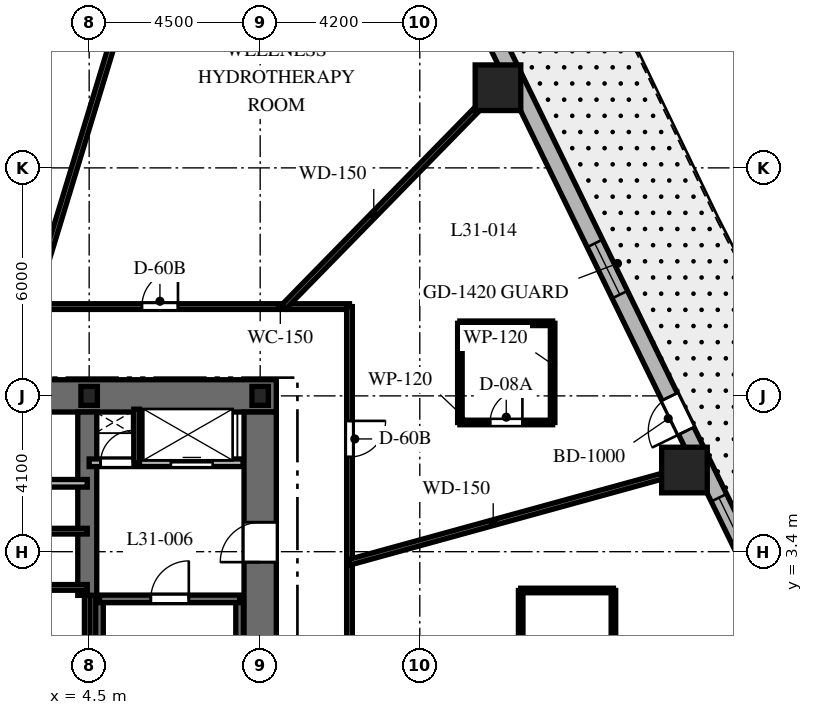
"""IFC4 building model, lengths in metres.
Left out: names, types, materials, properties, quantities, classifications, styles, units other than length and angle.
Written with IfcOpenShell. Run it as: python <this file> out.ifc"""

import sys

from ifc_helpers import new_model, si_unit, direction, frame, frame_2d, origin, origin_2d, place, context, subcontext, project, spatial, rectangle, i_section, extrude, element, fill, save


model = new_model("IFC4")
c1 = context("Model", 3, precision=1e-05, world=origin(), true_north=direction((0.0, 1.0)))
c2 = subcontext(c1, "Body", "Model", "MODEL_VIEW")
j1 = project(units=[si_unit("LENGTHUNIT", "METRE"), si_unit("PLANEANGLEUNIT", "RADIAN")], contexts=[c1])
p1 = place(None, origin())
s1 = spatial("IfcSite", under=j1, at=p1, CompositionType="ELEMENT")
p2 = place(p1, origin())
s2 = spatial("IfcBuilding", under=s1, at=p2, CompositionType="ELEMENT")
p3 = place(p2, frame((0.0, 0.0, 128.4)))
s3 = spatial("IfcBuildingStorey", under=s2, at=p3, CompositionType="ELEMENT", Elevation=128.4)
p4 = place(p3, frame((1.85, 7.5, 0.0), z_axis=(0.0, 0.0, 1.0), x_axis=(1.0, 0.0, 0.0)))
e1 = element("IfcWall", 1, at=p4, inside=s3, PredefinedType="SHEAR", context=c2, shape_type="SweptSolid", body=[
    extrude(rectangle(XDim=7.575, YDim=0.85, at=frame_2d((3.788, 0.0))), origin(), (0.0, 0.0, 1.0), 3.7),
])
p5 = place(p3, frame((9.0, -7.075, 0.0), z_axis=(0.0, 0.0, 1.0), x_axis=(0.0, 1.0, 0.0)))
e2 = element("IfcWall", 2, at=p5, inside=s3, PredefinedType="SHEAR", context=c2, shape_type="SweptSolid", body=[
    extrude(rectangle(XDim=14.15, YDim=0.85, at=frame_2d((7.075, 0.0))), origin(), (0.0, 0.0, 1.0), 3.7),
])
p6 = place(p5, frame((10.2, 0.0, 0.0)))
e3 = element("IfcOpeningElement", 3, at=p6, cuts=e2, PredefinedType="OPENING", context=c2, shape_type="SweptSolid", body=[
    extrude(rectangle(XDim=1.05, YDim=2.15, at=frame_2d((0.525, 1.075))), frame((0.0, 0.435, 0.0), z_axis=(0.0, -1.0, 0.0), x_axis=(1.0, 0.0, 0.0)), (0.0, 0.0, 1.0), 0.87),
])
p7 = place(p3, frame((4.45, 2.25, 0.0), z_axis=(0.0, 0.0, 1.0), x_axis=(0.0, 1.0, 0.0)))
e4 = element("IfcWall", 4, at=p7, inside=s3, PredefinedType="SHEAR", context=c2, shape_type="SweptSolid", body=[
    extrude(rectangle(XDim=4.825, YDim=0.5, at=frame_2d((2.413, 0.0))), origin(), (0.0, 0.0, 1.0), 3.7),
])
for number, where, z_axis, x_axis in (
    (5, (4.772, -6.985, 0.0), (0.0, 0.0, 1.0), (0.0, 1.0, 0.0)),
    (6, (8.458, -6.985, 0.0), (0.0, 0.0, 1.0), (0.0, 1.0, 0.0)),
):
    element("IfcWall", number, at=place(p3, frame(where, z_axis=z_axis, x_axis=x_axis)), inside=s3, PredefinedType="SHEAR", context=c2, shape_type="SweptSolid", body=[
        extrude(rectangle(XDim=9.143, YDim=0.2, at=frame_2d((4.572, 0.0))), origin(), (0.0, 0.0, 1.0), 3.7),
    ])
p8 = place(p3, frame((4.772, 2.158, 0.0), z_axis=(0.0, 0.0, 1.0), x_axis=(1.0, 0.0, 0.0)))
e7 = element("IfcWall", 7, at=p8, inside=s3, PredefinedType="SHEAR", context=c2, shape_type="SweptSolid", body=[
    extrude(rectangle(XDim=3.686, YDim=0.2, at=frame_2d((1.843, 0.0))), origin(), (0.0, 0.0, 1.0), 3.7),
])
p9 = place(p8, frame((1.35, 0.0, 0.0)))
e8 = element("IfcOpeningElement", 8, at=p9, cuts=e7, PredefinedType="OPENING", context=c2, shape_type="SweptSolid", body=[
    extrude(rectangle(XDim=1.0, YDim=2.15, at=frame_2d((0.5, 1.075))), frame((0.0, 0.11, 0.0), z_axis=(0.0, -1.0, 0.0), x_axis=(1.0, 0.0, 0.0)), (0.0, 0.0, 1.0), 0.22),
])
for number, where, z_axis, x_axis in (
    (9, (9.0, 7.5, 0.0), (0.0, 0.0, 1.0), (1.0, 0.0, 0.0)),
    (10, (4.5, 7.5, 0.0), (0.0, 0.0, 1.0), (1.0, 0.0, 0.0)),
):
    element("IfcColumn", number, at=place(p3, frame(where, z_axis=z_axis, x_axis=x_axis)), inside=s3, PredefinedType="COLUMN", context=c2, shape_type="SweptSolid", body=[
        extrude(i_section(OverallWidth=0.432, OverallDepth=0.498, WebThickness=0.056, FlangeThickness=0.089, at=origin_2d()), origin(), (0.0, 0.0, 1.0), 3.7),
    ])
for number, where, z_axis, x_axis in (
    (11, (20.164, 5.549, 0.0), (0.0, 0.0, 1.0), (1.0, 0.0, 0.0)),
    (12, (15.257, 15.609, 0.0), (0.0, 0.0, 1.0), (1.0, 0.0, 0.0)),
):
    element("IfcColumn", number, at=place(p3, frame(where, z_axis=z_axis, x_axis=x_axis)), inside=s3, PredefinedType="COLUMN", context=c2, shape_type="SweptSolid", body=[
        extrude(rectangle(XDim=1.2, YDim=1.2, at=origin_2d()), origin(), (0.0, 0.0, 1.0), 3.7),
    ])
p10 = place(p3, frame((22.238, 2.427, 0.0), z_axis=(0.0, 0.0, 1.0), x_axis=(-0.438374803278, 0.898792262901, 0.0)))
e13 = element("IfcWall", 13, at=p10, inside=s3, PredefinedType="SOLIDWALL", context=c2, shape_type="SweptSolid", body=[
    extrude(rectangle(XDim=18.618, YDim=0.45, at=frame_2d((9.309, 0.0))), origin(), (0.0, 0.0, 1.0), 3.4),
])
p11 = place(p10, frame((4.62, 0.0, 0.0)))
e14 = element("IfcOpeningElement", 14, at=p11, cuts=e13, PredefinedType="OPENING", context=c2, shape_type="SweptSolid", body=[
    extrude(rectangle(XDim=1.0, YDim=2.15, at=frame_2d((0.5, 1.075))), frame((0.0, 0.235, 0.0), z_axis=(0.0, -1.0, 0.0), x_axis=(1.0, 0.0, 0.0)), (0.0, 0.0, 1.0), 0.47),
])
p12 = place(p10, frame((8.61, 0.0, 0.8)))
e15 = element("IfcOpeningElement", 15, at=p12, cuts=e13, PredefinedType="OPENING", context=c2, shape_type="SweptSolid", body=[
    extrude(rectangle(XDim=1.5, YDim=1.8, at=frame_2d((0.75, 0.9))), frame((0.0, 0.235, 0.0), z_axis=(0.0, -1.0, 0.0), x_axis=(1.0, 0.0, 0.0)), (0.0, 0.0, 1.0), 0.47),
])
p13 = place(p10, frame((16.006, 0.0, 0.8)))
e16 = element("IfcOpeningElement", 16, at=p13, cuts=e13, PredefinedType="OPENING", context=c2, shape_type="SweptSolid", body=[
    extrude(rectangle(XDim=1.5, YDim=1.8, at=frame_2d((0.75, 0.9))), frame((0.0, 0.235, 0.0), z_axis=(0.0, -1.0, 0.0), x_axis=(1.0, 0.0, 0.0)), (0.0, 0.0, 1.0), 0.47),
])
p14 = place(p10, frame((1.163, 0.0, 0.8)))
e17 = element("IfcOpeningElement", 17, at=p14, cuts=e13, PredefinedType="OPENING", context=c2, shape_type="SweptSolid", body=[
    extrude(rectangle(XDim=1.5, YDim=1.8, at=frame_2d((0.75, 0.9))), frame((0.0, 0.235, 0.0), z_axis=(0.0, -1.0, 0.0), x_axis=(1.0, 0.0, 0.0)), (0.0, 0.0, 1.0), 0.47),
])
p15 = place(p3, frame((4.5, 5.74, 0.0), z_axis=(0.0, 0.0, 1.0), x_axis=(1.0, 0.0, 0.0)))
e18 = element("IfcWall", 18, at=p15, inside=s3, PredefinedType="PARTITIONING", context=c2, shape_type="SweptSolid", body=[
    extrude(rectangle(XDim=4.05, YDim=0.2, at=frame_2d((2.025, 0.0))), origin(), (0.0, 0.0, 1.0), 3.4),
])
p16 = place(p15, frame((0.3, 0.0, 0.0)))
e19 = element("IfcOpeningElement", 19, at=p16, cuts=e18, PredefinedType="OPENING", context=c2, shape_type="SweptSolid", body=[
    extrude(rectangle(XDim=0.85, YDim=2.03, at=frame_2d((0.425, 1.015))), frame((0.0, 0.11, 0.0), z_axis=(0.0, -1.0, 0.0), x_axis=(1.0, 0.0, 0.0)), (0.0, 0.0, 1.0), 0.22),
])
p17 = place(p15, frame((2.15, 0.0, 0.0)))
e20 = element("IfcOpeningElement", 20, at=p17, cuts=e18, PredefinedType="OPENING", context=c2, shape_type="SweptSolid", body=[
    extrude(rectangle(XDim=1.1, YDim=2.2, at=frame_2d((0.55, 1.1))), frame((0.0, 0.11, 0.0), z_axis=(0.0, -1.0, 0.0), x_axis=(1.0, 0.0, 0.0)), (0.0, 0.0, 1.0), 0.22),
])
p18 = place(p3, frame((5.75, 5.74, 0.0), z_axis=(0.0, 0.0, 1.0), x_axis=(0.0, 1.0, 0.0)))
e21 = element("IfcWall", 21, at=p18, inside=s3, PredefinedType="PARTITIONING", context=c2, shape_type="SweptSolid", body=[
    extrude(rectangle(XDim=1.41, YDim=0.15, at=frame_2d((0.705, 0.0))), origin(), (0.0, 0.0, 1.0), 3.4),
])
p19 = place(p3, frame((1.85, 5.2, 0.0), z_axis=(0.0, 0.0, 1.0), x_axis=(1.0, 0.0, 0.0)))
e22 = element("IfcWall", 22, at=p19, inside=s3, PredefinedType="PARTITIONING", context=c2, shape_type="SweptSolid", body=[
    extrude(rectangle(XDim=2.6, YDim=0.2, at=frame_2d((1.3, 0.0))), origin(), (0.0, 0.0, 1.0), 3.4),
])
p20 = place(p3, frame((4.45, -1.972, 0.0), z_axis=(0.0, 0.0, 1.0), x_axis=(0.0, 1.0, 0.0)))
e23 = element("IfcWall", 23, at=p20, inside=s3, PredefinedType="PARTITIONING", context=c2, shape_type="SweptSolid", body=[
    extrude(rectangle(XDim=4.222, YDim=0.15, at=frame_2d((2.111, 0.0))), origin(), (0.0, 0.0, 1.0), 3.4),
])
for number, where, z_axis, x_axis in (
    (24, (1.9, 3.94, 0.0), (0.0, 0.0, 1.0), (1.0, 0.0, 0.0)),
    (25, (1.9, 2.46, 0.0), (0.0, 0.0, 1.0), (1.0, 0.0, 0.0)),
):
    element("IfcWall", number, at=place(p3, frame(where, z_axis=z_axis, x_axis=x_axis)), inside=s3, PredefinedType="PARTITIONING", context=c2, shape_type="SweptSolid", body=[
        extrude(rectangle(XDim=2.55, YDim=0.15, at=frame_2d((1.275, 0.0))), origin(), (0.0, 0.0, 1.0), 3.4),
    ])
p21 = place(p3, frame((-11.35, 9.85, 0.0), z_axis=(0.0, 0.0, 1.0), x_axis=(1.0, 0.0, 0.0)))
e26 = element("IfcWall", 26, at=p21, inside=s3, PredefinedType="PARTITIONING", context=c2, shape_type="SweptSolid", body=[
    extrude(rectangle(XDim=22.7, YDim=0.15, at=frame_2d((11.35, 0.0))), origin(), (0.0, 0.0, 1.0), 2.84),
])
p22 = place(p21, frame((17.237, 0.0, 0.0)))
e27 = element("IfcOpeningElement", 27, at=p22, cuts=e26, PredefinedType="OPENING", context=c2, shape_type="SweptSolid", body=[
    extrude(rectangle(XDim=0.95, YDim=2.03, at=frame_2d((0.475, 1.015))), frame((0.0, 0.085, 0.0), z_axis=(0.0, -1.0, 0.0), x_axis=(1.0, 0.0, 0.0)), (0.0, 0.0, 1.0), 0.17),
])
p23 = place(p21, frame((11.994, 0.0, 0.0)))
e28 = element("IfcOpeningElement", 28, at=p23, cuts=e26, PredefinedType="OPENING", context=c2, shape_type="SweptSolid", body=[
    extrude(rectangle(XDim=0.95, YDim=2.03, at=frame_2d((0.475, 1.015))), frame((0.0, 0.085, 0.0), z_axis=(0.0, -1.0, 0.0), x_axis=(1.0, 0.0, 0.0)), (0.0, 0.0, 1.0), 0.17),
])
p24 = place(p21, frame((8.559, 0.0, 0.0)))
e29 = element("IfcOpeningElement", 29, at=p24, cuts=e26, PredefinedType="OPENING", context=c2, shape_type="SweptSolid", body=[
    extrude(rectangle(XDim=0.95, YDim=2.03, at=frame_2d((0.475, 1.015))), frame((0.0, 0.085, 0.0), z_axis=(0.0, -1.0, 0.0), x_axis=(1.0, 0.0, 0.0)), (0.0, 0.0, 1.0), 0.17),
])
p25 = place(p21, frame((3.399, 0.0, 0.0)))
e30 = element("IfcOpeningElement", 30, at=p25, cuts=e26, PredefinedType="OPENING", context=c2, shape_type="SweptSolid", body=[
    extrude(rectangle(XDim=0.95, YDim=2.03, at=frame_2d((0.475, 1.015))), frame((0.0, 0.085, 0.0), z_axis=(0.0, -1.0, 0.0), x_axis=(1.0, 0.0, 0.0)), (0.0, 0.0, 1.0), 0.17),
])
p26 = place(p3, frame((11.35, 9.85, 0.0), z_axis=(0.0, 0.0, 1.0), x_axis=(0.0, -1.0, 0.0)))
e31 = element("IfcWall", 31, at=p26, inside=s3, PredefinedType="PARTITIONING", context=c2, shape_type="SweptSolid", body=[
    extrude(rectangle(XDim=19.7, YDim=0.15, at=frame_2d((9.85, 0.0))), origin(), (0.0, 0.0, 1.0), 2.84),
])
p27 = place(p26, frame((3.008, 0.0, 0.0)))
e32 = element("IfcOpeningElement", 32, at=p27, cuts=e31, PredefinedType="OPENING", context=c2, shape_type="SweptSolid", body=[
    extrude(rectangle(XDim=0.95, YDim=2.03, at=frame_2d((0.475, 1.015))), frame((0.0, 0.085, 0.0), z_axis=(0.0, -1.0, 0.0), x_axis=(1.0, 0.0, 0.0)), (0.0, 0.0, 1.0), 0.17),
])
p28 = place(p26, frame((15.205, 0.0, 0.0)))
e33 = element("IfcOpeningElement", 33, at=p28, cuts=e31, PredefinedType="OPENING", context=c2, shape_type="SweptSolid", body=[
    extrude(rectangle(XDim=0.95, YDim=2.03, at=frame_2d((0.475, 1.015))), frame((0.0, 0.085, 0.0), z_axis=(0.0, -1.0, 0.0), x_axis=(1.0, 0.0, 0.0)), (0.0, 0.0, 1.0), 0.17),
])
p29 = place(p26, frame((8.836, 0.0, 0.0)))
e34 = element("IfcOpeningElement", 34, at=p29, cuts=e31, PredefinedType="OPENING", context=c2, shape_type="SweptSolid", body=[
    extrude(rectangle(XDim=0.95, YDim=2.03, at=frame_2d((0.475, 1.015))), frame((0.0, 0.085, 0.0), z_axis=(0.0, -1.0, 0.0), x_axis=(1.0, 0.0, 0.0)), (0.0, 0.0, 1.0), 0.17),
])
p30 = place(p3, frame((11.35, 3.123, 0.0), z_axis=(0.0, 0.0, 1.0), x_axis=(0.964151983214, 0.265350623261, 0.0)))
e35 = element("IfcWall", 35, at=p30, inside=s3, PredefinedType="PARTITIONING", context=c2, shape_type="SweptSolid", body=[
    extrude(rectangle(XDim=9.645, YDim=0.15, at=frame_2d((4.823, 0.0))), origin(), (0.0, 0.0, 1.0), 2.54),
])
p31 = place(p3, frame((9.628, 9.85, 0.0), z_axis=(0.0, 0.0, 1.0), x_axis=(0.698992824326, 0.715128681805, 0.0)))
e36 = element("IfcWall", 36, at=p31, inside=s3, PredefinedType="PARTITIONING", context=c2, shape_type="SweptSolid", body=[
    extrude(rectangle(XDim=8.579, YDim=0.15, at=frame_2d((4.29, 0.0))), origin(), (0.0, 0.0, 1.0), 2.54),
])
p32 = place(p3, frame((3.0, 9.85, 0.0), z_axis=(0.0, 0.0, 1.0), x_axis=(0.291352035382, 0.95661590593, 0.0)))
e37 = element("IfcWall", 37, at=p32, inside=s3, PredefinedType="PARTITIONING", context=c2, shape_type="SweptSolid", body=[
    extrude(rectangle(XDim=11.734, YDim=0.15, at=frame_2d((5.867, 0.0))), origin(), (0.0, 0.0, 1.0), 2.54),
])
p33 = place(p3, frame((14.255, 6.8, 0.0), z_axis=(0.0, 0.0, 1.0), x_axis=(1.0, 0.0, 0.0)))
e38 = element("IfcWall", 38, at=p33, inside=s3, PredefinedType="PARTITIONING", context=c2, shape_type="SweptSolid", body=[
    extrude(rectangle(XDim=2.44, YDim=0.12, at=frame_2d((1.22, 0.0))), origin(), (0.0, 0.0, 1.0), 2.927),
])
p34 = place(p33, frame((0.795, 0.0, 0.0)))
e39 = element("IfcOpeningElement", 39, at=p34, cuts=e38, PredefinedType="OPENING", context=c2, shape_type="SweptSolid", body=[
    extrude(rectangle(XDim=0.85, YDim=2.03, at=frame_2d((0.425, 1.015))), frame((0.0, 0.07, 0.0), z_axis=(0.0, -1.0, 0.0), x_axis=(1.0, 0.0, 0.0)), (0.0, 0.0, 1.0), 0.14),
])
p35 = place(p3, frame((16.695, 6.8, 0.0), z_axis=(0.0, 0.0, 1.0), x_axis=(0.0, 1.0, 0.0)))
e40 = element("IfcWall", 40, at=p35, inside=s3, PredefinedType="PARTITIONING", context=c2, shape_type="SweptSolid", body=[
    extrude(rectangle(XDim=2.61, YDim=0.12, at=frame_2d((1.305, 0.0))), origin(), (0.0, 0.0, 1.0), 3.4),
])
p36 = place(p3, frame((16.695, 9.41, 0.0), z_axis=(0.0, 0.0, 1.0), x_axis=(-1.0, 0.0, 0.0)))
e41 = element("IfcWall", 41, at=p36, inside=s3, PredefinedType="PARTITIONING", context=c2, shape_type="SweptSolid", body=[
    extrude(rectangle(XDim=2.44, YDim=0.12, at=frame_2d((1.22, 0.0))), origin(), (0.0, 0.0, 1.0), 2.927),
])
for number, where, z_axis, x_axis in (
    (42, (14.255, 9.41, 0.0), (0.0, 0.0, 1.0), (0.0, -1.0, 0.0)),
    (43, (18.295, -0.231, 0.0), (0.0, 0.0, 1.0), (0.0, 1.0, 0.0)),
):
    element("IfcWall", number, at=place(p3, frame(where, z_axis=z_axis, x_axis=x_axis)), inside=s3, PredefinedType="PARTITIONING", context=c2, shape_type="SweptSolid", body=[
        extrude(rectangle(XDim=2.61, YDim=0.12, at=frame_2d((1.305, 0.0))), origin(), (0.0, 0.0, 1.0), 3.4),
    ])
p37 = place(p3, frame((18.295, 2.379, 0.0), z_axis=(0.0, 0.0, 1.0), x_axis=(-1.0, 0.0, 0.0)))
e44 = element("IfcWall", 44, at=p37, inside=s3, PredefinedType="PARTITIONING", context=c2, shape_type="SweptSolid", body=[
    extrude(rectangle(XDim=2.44, YDim=0.12, at=frame_2d((1.22, 0.0))), origin(), (0.0, 0.0, 1.0), 2.841),
])
p38 = place(p3, frame((15.855, 2.379, 0.0), z_axis=(0.0, 0.0, 1.0), x_axis=(0.0, -1.0, 0.0)))
e45 = element("IfcWall", 45, at=p38, inside=s3, PredefinedType="PARTITIONING", context=c2, shape_type="SweptSolid", body=[
    extrude(rectangle(XDim=2.61, YDim=0.12, at=frame_2d((1.305, 0.0))), origin(), (0.0, 0.0, 1.0), 3.4),
])
p39 = place(p11, origin())
e46 = element("IfcDoor", 46, at=p39, inside=s3, OperationType="SINGLE_SWING_LEFT", PredefinedType="DOOR", context=c2, shape_type="SweptSolid", body=[
    extrude(rectangle(XDim=1.0, YDim=2.15, at=frame_2d((0.5, 1.075))), frame((0.0, 0.025, 0.0), z_axis=(0.0, -1.0, 0.0), x_axis=(1.0, 0.0, 0.0)), (0.0, 0.0, 1.0), 0.05),
])
fill(e14, e46)
p40 = place(p12, origin())
e47 = element("IfcWindow", 47, at=p40, inside=s3, PartitioningType="SINGLE_PANEL", PredefinedType="WINDOW", context=c2, shape_type="SweptSolid", body=[
    extrude(rectangle(XDim=1.5, YDim=1.8, at=frame_2d((0.75, 0.9))), frame((0.0, 0.03, 0.0), z_axis=(0.0, -1.0, 0.0), x_axis=(1.0, 0.0, 0.0)), (0.0, 0.0, 1.0), 0.06),
])
fill(e15, e47)
p41 = place(p14, origin())
e48 = element("IfcWindow", 48, at=p41, inside=s3, PartitioningType="SINGLE_PANEL", PredefinedType="WINDOW", context=c2, shape_type="SweptSolid", body=[
    extrude(rectangle(XDim=1.5, YDim=1.8, at=frame_2d((0.75, 0.9))), frame((0.0, 0.03, 0.0), z_axis=(0.0, -1.0, 0.0), x_axis=(1.0, 0.0, 0.0)), (0.0, 0.0, 1.0), 0.06),
])
fill(e17, e48)
p42 = place(p9, origin())
e49 = element("IfcDoor", 49, at=p42, inside=s3, OperationType="SINGLE_SWING_RIGHT", PredefinedType="DOOR", context=c2, shape_type="SweptSolid", body=[
    extrude(rectangle(XDim=1.0, YDim=2.15, at=frame_2d((0.5, 1.075))), frame((0.0, 0.025, 0.0), z_axis=(0.0, -1.0, 0.0), x_axis=(1.0, 0.0, 0.0)), (0.0, 0.0, 1.0), 0.05),
])
fill(e8, e49)
p43 = place(p6, origin())
e50 = element("IfcDoor", 50, at=p43, inside=s3, OperationType="SINGLE_SWING_LEFT", PredefinedType="DOOR", context=c2, shape_type="SweptSolid", body=[
    extrude(rectangle(XDim=1.05, YDim=2.15, at=frame_2d((0.525, 1.075))), frame((0.0, 0.025, 0.0), z_axis=(0.0, -1.0, 0.0), x_axis=(1.0, 0.0, 0.0)), (0.0, 0.0, 1.0), 0.05),
])
fill(e3, e50)
p44 = place(p16, origin())
e51 = element("IfcDoor", 51, at=p44, inside=s3, OperationType="SINGLE_SWING_RIGHT", PredefinedType="DOOR", context=c2, shape_type="SweptSolid", body=[
    extrude(rectangle(XDim=0.85, YDim=2.03, at=frame_2d((0.425, 1.015))), frame((0.0, 0.025, 0.0), z_axis=(0.0, -1.0, 0.0), x_axis=(1.0, 0.0, 0.0)), (0.0, 0.0, 1.0), 0.05),
])
fill(e19, e51)
p45 = place(p17, origin())
e52 = element("IfcDoor", 52, at=p45, inside=s3, OperationType="SLIDING_TO_RIGHT", PredefinedType="DOOR", context=c2, shape_type="SweptSolid", body=[
    extrude(rectangle(XDim=1.1, YDim=2.2, at=frame_2d((0.55, 1.1))), frame((0.0, 0.025, 0.0), z_axis=(0.0, -1.0, 0.0), x_axis=(1.0, 0.0, 0.0)), (0.0, 0.0, 1.0), 0.05),
])
fill(e20, e52)
p46 = place(p27, origin())
e53 = element("IfcDoor", 53, at=p46, inside=s3, OperationType="SINGLE_SWING_LEFT", PredefinedType="DOOR", context=c2, shape_type="SweptSolid", body=[
    extrude(rectangle(XDim=0.95, YDim=2.03, at=frame_2d((0.475, 1.015))), frame((0.0, 0.025, 0.0), z_axis=(0.0, -1.0, 0.0), x_axis=(1.0, 0.0, 0.0)), (0.0, 0.0, 1.0), 0.05),
])
fill(e32, e53)
p47 = place(p34, origin())
e54 = element("IfcDoor", 54, at=p47, inside=s3, OperationType="SINGLE_SWING_RIGHT", PredefinedType="DOOR", context=c2, shape_type="SweptSolid", body=[
    extrude(rectangle(XDim=0.85, YDim=2.03, at=frame_2d((0.425, 1.015))), frame((0.0, 0.025, 0.0), z_axis=(0.0, -1.0, 0.0), x_axis=(1.0, 0.0, 0.0)), (0.0, 0.0, 1.0), 0.05),
])
fill(e39, e54)
p48 = place(p22, origin())
e55 = element("IfcDoor", 55, at=p48, inside=s3, OperationType="SINGLE_SWING_RIGHT", PredefinedType="DOOR", context=c2, shape_type="SweptSolid", body=[
    extrude(rectangle(XDim=0.95, YDim=2.03, at=frame_2d((0.475, 1.015))), frame((0.0, 0.025, 0.0), z_axis=(0.0, -1.0, 0.0), x_axis=(1.0, 0.0, 0.0)), (0.0, 0.0, 1.0), 0.05),
])
fill(e27, e55)
save(model, sys.argv[1])
